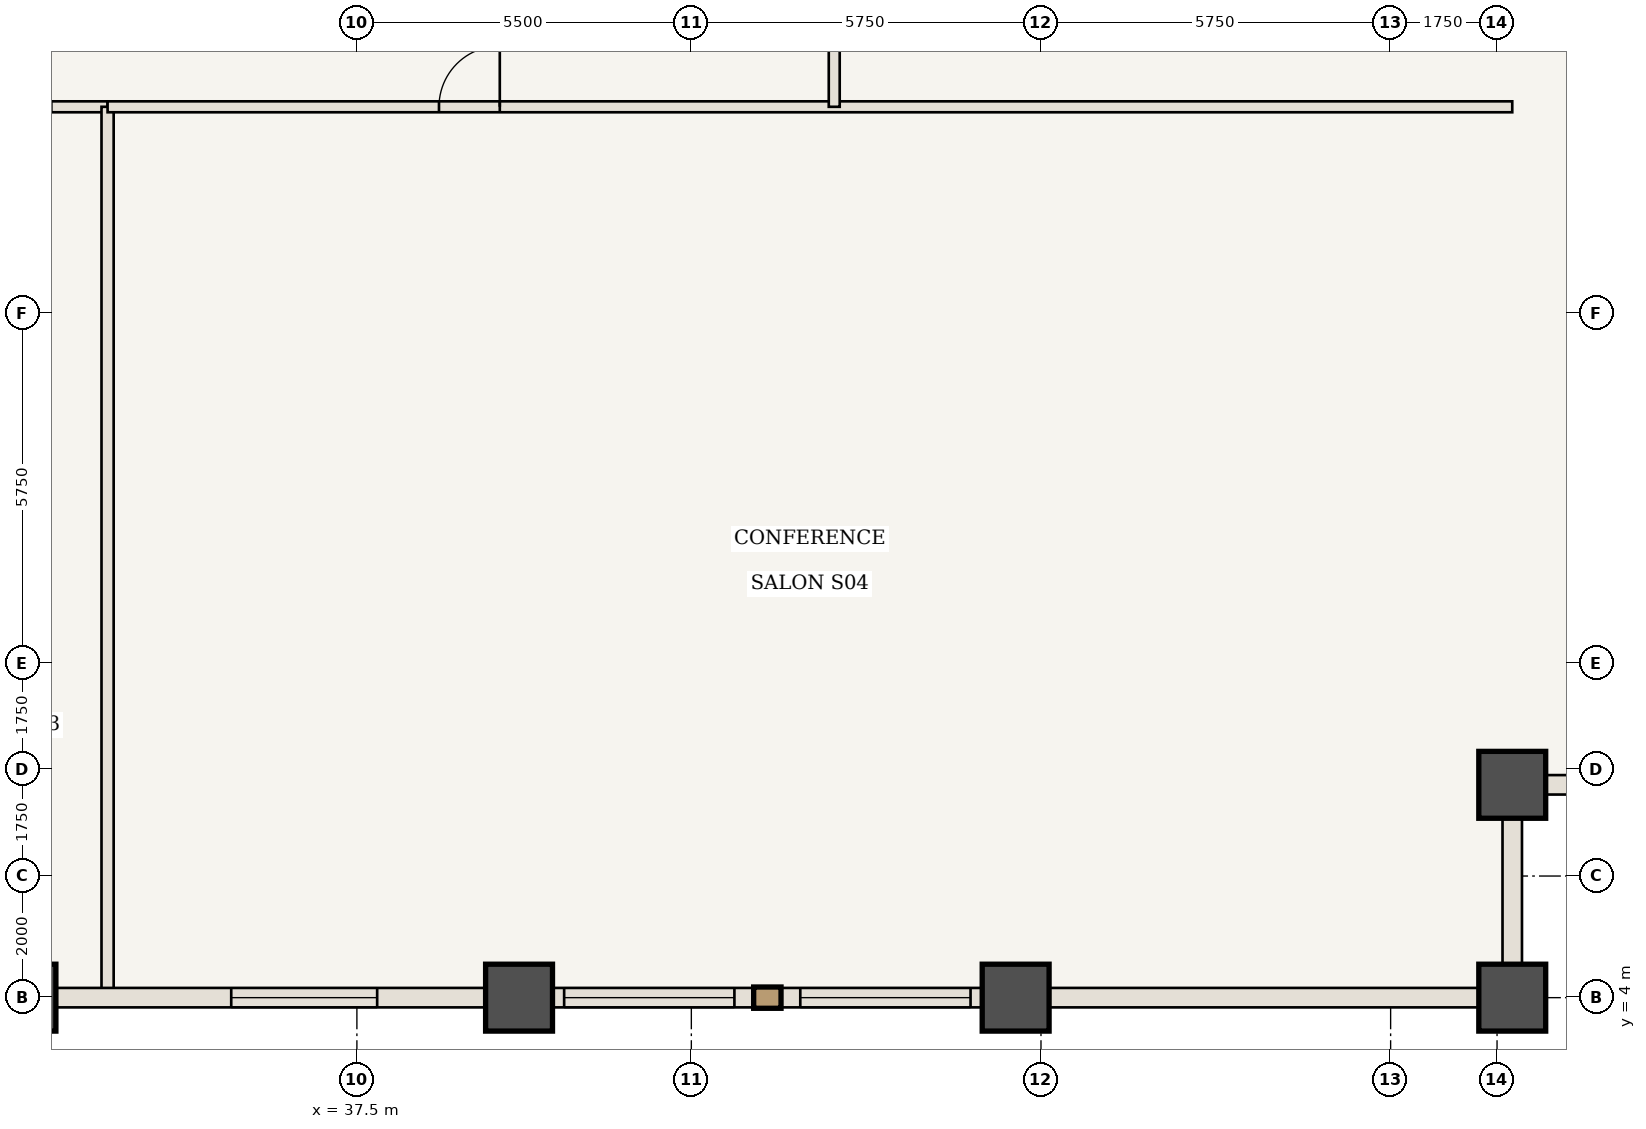
"""IFC4 building model, lengths in metres.
Left out: names, types, materials, properties, quantities, classifications, styles, units other than length and angle.
Written with IfcOpenShell. Run it as: python <this file> out.ifc"""

import sys

from ifc_helpers import new_model, si_unit, direction, frame, frame_2d, origin, origin_2d, place, context, subcontext, project, spatial, rectangle, extrude, element, fill, save


model = new_model("IFC4")
c1 = context("Model", 3, precision=1e-05, world=origin(), true_north=direction((0.0, 1.0)))
c2 = subcontext(c1, "Body", "Model", "MODEL_VIEW")
j1 = project(units=[si_unit("LENGTHUNIT", "METRE"), si_unit("PLANEANGLEUNIT", "RADIAN")], contexts=[c1])
p1 = place(None, origin())
s1 = spatial("IfcSite", under=j1, at=p1, CompositionType="ELEMENT")
p2 = place(p1, origin())
s2 = spatial("IfcBuilding", under=s1, at=p2, CompositionType="ELEMENT")
p3 = place(p2, frame((0.0, 0.0, 59.85)))
s3 = spatial("IfcBuildingStorey", under=s2, at=p3, CompositionType="ELEMENT", Elevation=59.85)
for number, where, z_axis, x_axis in (
    (1, (56.5, 4.0, 0.0), (0.0, 0.0, 1.0), (1.0, 0.0, 0.0)),
    (2, (56.5, 7.5, 0.0), (0.0, 0.0, 1.0), (1.0, 0.0, 0.0)),
    (3, (32.0, 4.0, 0.0), (0.0, 0.0, 1.0), (1.0, 0.0, 0.0)),
    (4, (40.167, 4.0, 0.0), (0.0, 0.0, 1.0), (1.0, 0.0, 0.0)),
    (5, (48.333, 4.0, 0.0), (0.0, 0.0, 1.0), (1.0, 0.0, 0.0)),
):
    element("IfcColumn", number, at=place(p3, frame(where, z_axis=z_axis, x_axis=x_axis)), inside=s3, PredefinedType="COLUMN", context=c2, shape_type="SweptSolid", body=[
        extrude(rectangle(XDim=1.1, YDim=1.1, at=origin_2d()), origin(), (0.0, 0.0, 1.0), 3.5),
    ])
p4 = place(p3, frame((28.7, 18.65, 0.0), z_axis=(0.0, 0.0, 1.0), x_axis=(1.0, 0.0, 0.0)))
e6 = element("IfcWall", 6, at=p4, inside=s3, PredefinedType="STANDARD", context=c2, shape_type="SweptSolid", body=[
    extrude(rectangle(XDim=4.7, YDim=0.18, at=frame_2d((2.35, 0.0))), origin(), (0.0, 0.0, 1.0), 3.32),
])
p5 = place(p4, frame((2.775, 0.0, 0.0)))
e7 = element("IfcOpeningElement", 7, at=p5, cuts=e6, PredefinedType="OPENING", context=c2, shape_type="SweptSolid", body=[
    extrude(rectangle(XDim=1.0, YDim=2.15, at=frame_2d((0.5, 1.075))), frame((0.0, 0.1, 0.0), z_axis=(0.0, -1.0, 0.0), x_axis=(1.0, 0.0, 0.0)), (0.0, 0.0, 1.0), 0.2),
])
p6 = place(p3, frame((33.4, 4.06, 0.0), z_axis=(0.0, 0.0, 1.0), x_axis=(0.0, 1.0, 0.0)))
e8 = element("IfcWall", 8, at=p6, inside=s3, PredefinedType="STANDARD", context=c2, shape_type="SweptSolid", body=[
    extrude(rectangle(XDim=14.59, YDim=0.2, at=frame_2d((7.295, 0.0))), origin(), (0.0, 0.0, 1.0), 3.32),
])
p7 = place(p3, frame((33.4, 18.65, 0.0), z_axis=(0.0, 0.0, 1.0), x_axis=(1.0, 0.0, 0.0)))
e9 = element("IfcWall", 9, at=p7, inside=s3, PredefinedType="STANDARD", context=c2, shape_type="SweptSolid", body=[
    extrude(rectangle(XDim=23.1, YDim=0.18, at=frame_2d((11.55, 0.0))), origin(), (0.0, 0.0, 1.0), 3.32),
])
p8 = place(p7, frame((5.45, 0.0, 0.0)))
e10 = element("IfcOpeningElement", 10, at=p8, cuts=e9, PredefinedType="OPENING", context=c2, shape_type="SweptSolid", body=[
    extrude(rectangle(XDim=1.0, YDim=2.15, at=frame_2d((0.5, 1.075))), frame((0.0, 0.1, 0.0), z_axis=(0.0, -1.0, 0.0), x_axis=(1.0, 0.0, 0.0)), (0.0, 0.0, 1.0), 0.2),
])
p9 = place(p3, frame((45.35, 18.65, 0.0), z_axis=(0.0, 0.0, 1.0), x_axis=(0.0, 1.0, 0.0)))
e11 = element("IfcWall", 11, at=p9, inside=s3, PredefinedType="STANDARD", context=c2, shape_type="SweptSolid", body=[
    extrude(rectangle(XDim=8.85, YDim=0.18, at=frame_2d((4.425, 0.0))), origin(), (0.0, 0.0, 1.0), 3.32),
])
p10 = place(p9, frame((3.925, 0.0, 0.0)))
e12 = element("IfcOpeningElement", 12, at=p10, cuts=e11, PredefinedType="OPENING", context=c2, shape_type="SweptSolid", body=[
    extrude(rectangle(XDim=1.0, YDim=2.15, at=frame_2d((0.5, 1.075))), frame((0.0, 0.1, 0.0), z_axis=(0.0, -1.0, 0.0), x_axis=(1.0, 0.0, 0.0)), (0.0, 0.0, 1.0), 0.2),
])
p11 = place(p3, frame((40.167, 4.0, 0.0), z_axis=(0.0, 0.0, 1.0), x_axis=(-1.0, 0.0, 0.0)))
e13 = element("IfcWall", 13, at=p11, inside=s3, PredefinedType="USERDEFINED", context=c2, shape_type="SweptSolid", body=[
    extrude(rectangle(XDim=8.167, YDim=0.32, at=frame_2d((4.083, 0.0))), origin(), (0.0, 0.0, 1.0), 2.52),
])
p12 = place(p11, frame((2.333, 0.0, 0.85)))
e14 = element("IfcOpeningElement", 14, at=p12, cuts=e13, PredefinedType="OPENING", context=c2, shape_type="SweptSolid", body=[
    extrude(rectangle(XDim=2.4, YDim=1.47, at=frame_2d((1.2, 0.735))), frame((0.0, 0.17, 0.0), z_axis=(0.0, -1.0, 0.0), x_axis=(1.0, 0.0, 0.0)), (0.0, 0.0, 1.0), 0.34),
])
p13 = place(p3, frame((48.333, 4.0, 0.0), z_axis=(0.0, 0.0, 1.0), x_axis=(-1.0, 0.0, 0.0)))
e15 = element("IfcWall", 15, at=p13, inside=s3, PredefinedType="USERDEFINED", context=c2, shape_type="SweptSolid", body=[
    extrude(rectangle(XDim=8.167, YDim=0.32, at=frame_2d((4.083, 0.0))), origin(), (0.0, 0.0, 1.0), 2.52),
])
p14 = place(p13, frame((0.742, 0.0, 0.85)))
e16 = element("IfcOpeningElement", 16, at=p14, cuts=e15, PredefinedType="OPENING", context=c2, shape_type="SweptSolid", body=[
    extrude(rectangle(XDim=2.8, YDim=1.47, at=frame_2d((1.4, 0.735))), frame((0.0, 0.17, 0.0), z_axis=(0.0, -1.0, 0.0), x_axis=(1.0, 0.0, 0.0)), (0.0, 0.0, 1.0), 0.34),
])
p15 = place(p13, frame((4.625, 0.0, 0.85)))
e17 = element("IfcOpeningElement", 17, at=p15, cuts=e15, PredefinedType="OPENING", context=c2, shape_type="SweptSolid", body=[
    extrude(rectangle(XDim=2.8, YDim=1.47, at=frame_2d((1.4, 0.735))), frame((0.0, 0.17, 0.0), z_axis=(0.0, -1.0, 0.0), x_axis=(1.0, 0.0, 0.0)), (0.0, 0.0, 1.0), 0.34),
])
p16 = place(p3, frame((56.5, 4.0, 0.0), z_axis=(0.0, 0.0, 1.0), x_axis=(-1.0, 0.0, 0.0)))
e18 = element("IfcWall", 18, at=p16, inside=s3, PredefinedType="USERDEFINED", context=c2, shape_type="SweptSolid", body=[
    extrude(rectangle(XDim=8.167, YDim=0.32, at=frame_2d((4.083, 0.0))), origin(), (0.0, 0.0, 1.0), 2.52),
])
for number, where, z_axis, x_axis in (
    (19, (56.5, 7.5, 0.0), (0.0, 0.0, 1.0), (0.0, -1.0, 0.0)),
    (20, (60.0, 7.5, 0.0), (0.0, 0.0, 1.0), (-1.0, 0.0, 0.0)),
):
    element("IfcWall", number, at=place(p3, frame(where, z_axis=z_axis, x_axis=x_axis)), inside=s3, PredefinedType="USERDEFINED", context=c2, shape_type="SweptSolid", body=[
        extrude(rectangle(XDim=3.5, YDim=0.32, at=frame_2d((1.75, 0.0))), origin(), (0.0, 0.0, 1.0), 2.52),
    ])
p17 = place(p8, origin())
e21 = element("IfcDoor", 21, at=p17, inside=s3, OperationType="SINGLE_SWING_RIGHT", PredefinedType="DOOR", context=c2, shape_type="SweptSolid", body=[
    extrude(rectangle(XDim=1.0, YDim=2.15, at=frame_2d((0.5, 1.075))), frame((0.0, 0.025, 0.0), z_axis=(0.0, -1.0, 0.0), x_axis=(1.0, 0.0, 0.0)), (0.0, 0.0, 1.0), 0.05),
])
fill(e10, e21)
p18 = place(p12, origin())
e22 = element("IfcWindow", 22, at=p18, inside=s3, PartitioningType="SINGLE_PANEL", PredefinedType="WINDOW", context=c2, shape_type="SweptSolid", body=[
    extrude(rectangle(XDim=2.4, YDim=1.47, at=frame_2d((1.2, 0.735))), frame((0.0, 0.03, 0.0), z_axis=(0.0, -1.0, 0.0), x_axis=(1.0, 0.0, 0.0)), (0.0, 0.0, 1.0), 0.06),
])
fill(e14, e22)
p19 = place(p14, origin())
e23 = element("IfcWindow", 23, at=p19, inside=s3, PartitioningType="SINGLE_PANEL", PredefinedType="WINDOW", context=c2, shape_type="SweptSolid", body=[
    extrude(rectangle(XDim=2.8, YDim=1.47, at=frame_2d((1.4, 0.735))), frame((0.0, 0.03, 0.0), z_axis=(0.0, -1.0, 0.0), x_axis=(1.0, 0.0, 0.0)), (0.0, 0.0, 1.0), 0.06),
])
fill(e16, e23)
p20 = place(p15, origin())
e24 = element("IfcWindow", 24, at=p20, inside=s3, PartitioningType="SINGLE_PANEL", PredefinedType="WINDOW", context=c2, shape_type="SweptSolid", body=[
    extrude(rectangle(XDim=2.8, YDim=1.47, at=frame_2d((1.4, 0.735))), frame((0.0, 0.03, 0.0), z_axis=(0.0, -1.0, 0.0), x_axis=(1.0, 0.0, 0.0)), (0.0, 0.0, 1.0), 0.06),
])
fill(e17, e24)
save(model, sys.argv[1])
